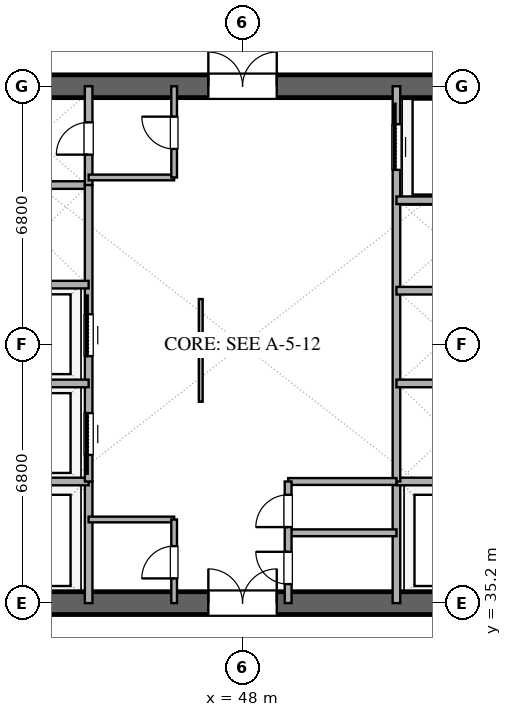
"""IFC4 building model, lengths in metres.
Left out: names, types, materials, properties, quantities, classifications, styles, units other than length and angle.
Written with IfcOpenShell. Run it as: python <this file> out.ifc"""

import sys

from ifc_helpers import new_model, si_unit, direction, frame, frame_2d, origin, place, context, subcontext, project, spatial, rectangle, extrude, element, fill, save


model = new_model("IFC4")
c1 = context("Model", 3, precision=1e-05, world=origin(), true_north=direction((0.0, 1.0)))
c2 = subcontext(c1, "Body", "Model", "MODEL_VIEW")
j1 = project(units=[si_unit("LENGTHUNIT", "METRE"), si_unit("PLANEANGLEUNIT", "RADIAN")], contexts=[c1])
p1 = place(None, origin())
s1 = spatial("IfcSite", under=j1, at=p1, CompositionType="ELEMENT")
p2 = place(p1, origin())
s2 = spatial("IfcBuilding", under=s1, at=p2, CompositionType="ELEMENT")
p3 = place(p2, frame((0.0, 0.0, 60.6)))
s3 = spatial("IfcBuildingStorey", under=s2, at=p3, CompositionType="ELEMENT", Elevation=60.6)
p4 = place(p3, frame((41.0, 35.2, 0.0), z_axis=(0.0, 0.0, 1.0), x_axis=(1.0, 0.0, 0.0)))
e1 = element("IfcWall", 1, at=p4, inside=s3, PredefinedType="SHEAR", context=c2, shape_type="SweptSolid", body=[
    extrude(rectangle(XDim=14.0, YDim=0.6, at=frame_2d((7.0, 0.0))), origin(), (0.0, 0.0, 1.0), 3.38),
])
p5 = place(p4, frame((6.1, 0.0, 0.0)))
e2 = element("IfcOpeningElement", 2, at=p5, cuts=e1, PredefinedType="OPENING", context=c2, shape_type="SweptSolid", body=[
    extrude(rectangle(XDim=1.8, YDim=2.25, at=frame_2d((0.9, 1.125))), frame((0.0, 0.31, 0.0), z_axis=(0.0, -1.0, 0.0), x_axis=(1.0, 0.0, 0.0)), (0.0, 0.0, 1.0), 0.62),
])
p6 = place(p3, frame((41.0, 48.8, 0.0), z_axis=(0.0, 0.0, 1.0), x_axis=(1.0, 0.0, 0.0)))
e3 = element("IfcWall", 3, at=p6, inside=s3, PredefinedType="SHEAR", context=c2, shape_type="SweptSolid", body=[
    extrude(rectangle(XDim=14.0, YDim=0.6, at=frame_2d((7.0, 0.0))), origin(), (0.0, 0.0, 1.0), 3.38),
])
p7 = place(p6, frame((6.1, 0.0, 0.0)))
e4 = element("IfcOpeningElement", 4, at=p7, cuts=e3, PredefinedType="OPENING", context=c2, shape_type="SweptSolid", body=[
    extrude(rectangle(XDim=1.8, YDim=2.25, at=frame_2d((0.9, 1.125))), frame((0.0, 0.31, 0.0), z_axis=(0.0, -1.0, 0.0), x_axis=(1.0, 0.0, 0.0)), (0.0, 0.0, 1.0), 0.62),
])
p8 = place(p3, frame((43.95, 35.2, 0.0), z_axis=(0.0, 0.0, 1.0), x_axis=(0.0, 1.0, 0.0)))
e5 = element("IfcWall", 5, at=p8, inside=s3, PredefinedType="SOLIDWALL", context=c2, shape_type="SweptSolid", body=[
    extrude(rectangle(XDim=3.2, YDim=0.2, at=frame_2d((1.6, 0.0))), origin(), (0.0, 0.0, 1.0), 2.74),
])
p9 = place(p3, frame((41.0, 38.4, 0.0), z_axis=(0.0, 0.0, 1.0), x_axis=(1.0, 0.0, 0.0)))
e6 = element("IfcWall", 6, at=p9, inside=s3, PredefinedType="SOLIDWALL", context=c2, shape_type="SweptSolid", body=[
    extrude(rectangle(XDim=2.95, YDim=0.2, at=frame_2d((1.475, 0.0))), origin(), (0.0, 0.0, 1.0), 2.74),
])
p10 = place(p3, frame((52.05, 35.2, 0.0), z_axis=(0.0, 0.0, 1.0), x_axis=(0.0, 1.0, 0.0)))
e7 = element("IfcWall", 7, at=p10, inside=s3, PredefinedType="SOLIDWALL", context=c2, shape_type="SweptSolid", body=[
    extrude(rectangle(XDim=3.2, YDim=0.2, at=frame_2d((1.6, 0.0))), origin(), (0.0, 0.0, 1.0), 2.74),
])
for number, where, z_axis, x_axis in (
    (8, (52.05, 38.4, 0.0), (0.0, 0.0, 1.0), (1.0, 0.0, 0.0)),
    (9, (41.0, 46.2, 0.0), (0.0, 0.0, 1.0), (1.0, 0.0, 0.0)),
):
    element("IfcWall", number, at=place(p3, frame(where, z_axis=z_axis, x_axis=x_axis)), inside=s3, PredefinedType="SOLIDWALL", context=c2, shape_type="SweptSolid", body=[
        extrude(rectangle(XDim=2.95, YDim=0.2, at=frame_2d((1.475, 0.0))), origin(), (0.0, 0.0, 1.0), 2.74),
    ])
p11 = place(p3, frame((43.95, 46.2, 0.0), z_axis=(0.0, 0.0, 1.0), x_axis=(0.0, 1.0, 0.0)))
e10 = element("IfcWall", 10, at=p11, inside=s3, PredefinedType="SOLIDWALL", context=c2, shape_type="SweptSolid", body=[
    extrude(rectangle(XDim=2.6, YDim=0.2, at=frame_2d((1.3, 0.0))), origin(), (0.0, 0.0, 1.0), 2.74),
])
p12 = place(p11, frame((0.8, 0.0, 0.0)))
e11 = element("IfcOpeningElement", 11, at=p12, cuts=e10, PredefinedType="OPENING", context=c2, shape_type="SweptSolid", body=[
    extrude(rectangle(XDim=0.85, YDim=2.15, at=frame_2d((0.425, 1.075))), frame((0.0, 0.11, 0.0), z_axis=(0.0, -1.0, 0.0), x_axis=(1.0, 0.0, 0.0)), (0.0, 0.0, 1.0), 0.22),
])
p13 = place(p3, frame((43.95, 38.4, 0.0), z_axis=(0.0, 0.0, 1.0), x_axis=(0.0, 1.0, 0.0)))
e12 = element("IfcWall", 12, at=p13, inside=s3, PredefinedType="SOLIDWALL", context=c2, shape_type="SweptSolid", body=[
    extrude(rectangle(XDim=7.8, YDim=0.2, at=frame_2d((3.9, 0.0))), origin(), (0.0, 0.0, 1.0), 2.74),
])
p14 = place(p13, frame((0.7, 0.0, 0.0)))
e13 = element("IfcOpeningElement", 13, at=p14, cuts=e12, PredefinedType="OPENING", context=c2, shape_type="SweptSolid", body=[
    extrude(rectangle(XDim=1.1, YDim=2.2, at=frame_2d((0.55, 1.1))), frame((0.0, 0.11, 0.0), z_axis=(0.0, -1.0, 0.0), x_axis=(1.0, 0.0, 0.0)), (0.0, 0.0, 1.0), 0.22),
])
p15 = place(p13, frame((3.3, 0.0, 0.0)))
e14 = element("IfcOpeningElement", 14, at=p15, cuts=e12, PredefinedType="OPENING", context=c2, shape_type="SweptSolid", body=[
    extrude(rectangle(XDim=1.1, YDim=2.2, at=frame_2d((0.55, 1.1))), frame((0.0, 0.11, 0.0), z_axis=(0.0, -1.0, 0.0), x_axis=(1.0, 0.0, 0.0)), (0.0, 0.0, 1.0), 0.22),
])
for number, where, z_axis, x_axis in (
    (15, (41.0, 40.98, 0.0), (0.0, 0.0, 1.0), (1.0, 0.0, 0.0)),
    (16, (41.0, 43.58, 0.0), (0.0, 0.0, 1.0), (1.0, 0.0, 0.0)),
):
    element("IfcWall", number, at=place(p3, frame(where, z_axis=z_axis, x_axis=x_axis)), inside=s3, PredefinedType="SOLIDWALL", context=c2, shape_type="SweptSolid", body=[
        extrude(rectangle(XDim=2.95, YDim=0.2, at=frame_2d((1.475, 0.0))), origin(), (0.0, 0.0, 1.0), 2.74),
    ])
p16 = place(p3, frame((52.05, 38.4, 0.0), z_axis=(0.0, 0.0, 1.0), x_axis=(0.0, 1.0, 0.0)))
e17 = element("IfcWall", 17, at=p16, inside=s3, PredefinedType="SOLIDWALL", context=c2, shape_type="SweptSolid", body=[
    extrude(rectangle(XDim=10.4, YDim=0.2, at=frame_2d((5.2, 0.0))), origin(), (0.0, 0.0, 1.0), 2.74),
])
p17 = place(p16, frame((8.2, 0.0, 0.0)))
e18 = element("IfcOpeningElement", 18, at=p17, cuts=e17, PredefinedType="OPENING", context=c2, shape_type="SweptSolid", body=[
    extrude(rectangle(XDim=1.2, YDim=2.2, at=frame_2d((0.6, 1.1))), frame((0.0, 0.11, 0.0), z_axis=(0.0, -1.0, 0.0), x_axis=(1.0, 0.0, 0.0)), (0.0, 0.0, 1.0), 0.22),
])
for number, where, z_axis, x_axis in (
    (19, (52.05, 40.98, 0.0), (0.0, 0.0, 1.0), (1.0, 0.0, 0.0)),
    (20, (52.05, 43.42, 0.0), (0.0, 0.0, 1.0), (1.0, 0.0, 0.0)),
    (21, (52.05, 45.8, 0.0), (0.0, 0.0, 1.0), (1.0, 0.0, 0.0)),
):
    element("IfcWall", number, at=place(p3, frame(where, z_axis=z_axis, x_axis=x_axis)), inside=s3, PredefinedType="SOLIDWALL", context=c2, shape_type="SweptSolid", body=[
        extrude(rectangle(XDim=2.95, YDim=0.2, at=frame_2d((1.475, 0.0))), origin(), (0.0, 0.0, 1.0), 2.74),
    ])
p18 = place(p3, frame((43.95, 37.4, 0.0), z_axis=(0.0, 0.0, 1.0), x_axis=(1.0, 0.0, 0.0)))
e22 = element("IfcWall", 22, at=p18, inside=s3, PredefinedType="PARTITIONING", context=c2, shape_type="SweptSolid", body=[
    extrude(rectangle(XDim=2.25, YDim=0.15, at=frame_2d((1.125, 0.0))), origin(), (0.0, 0.0, 1.0), 2.74),
])
p19 = place(p3, frame((46.2, 35.2, 0.0), z_axis=(0.0, 0.0, 1.0), x_axis=(0.0, 1.0, 0.0)))
e23 = element("IfcWall", 23, at=p19, inside=s3, PredefinedType="PARTITIONING", context=c2, shape_type="SweptSolid", body=[
    extrude(rectangle(XDim=2.2, YDim=0.15, at=frame_2d((1.1, 0.0))), origin(), (0.0, 0.0, 1.0), 2.74),
])
p20 = place(p19, frame((0.65, 0.0, 0.0)))
e24 = element("IfcOpeningElement", 24, at=p20, cuts=e23, PredefinedType="OPENING", context=c2, shape_type="SweptSolid", body=[
    extrude(rectangle(XDim=0.85, YDim=2.15, at=frame_2d((0.425, 1.075))), frame((0.0, 0.085, 0.0), z_axis=(0.0, -1.0, 0.0), x_axis=(1.0, 0.0, 0.0)), (0.0, 0.0, 1.0), 0.17),
])
p21 = place(p3, frame((43.95, 46.4, 0.0), z_axis=(0.0, 0.0, 1.0), x_axis=(1.0, 0.0, 0.0)))
e25 = element("IfcWall", 25, at=p21, inside=s3, PredefinedType="PARTITIONING", context=c2, shape_type="SweptSolid", body=[
    extrude(rectangle(XDim=2.25, YDim=0.15, at=frame_2d((1.125, 0.0))), origin(), (0.0, 0.0, 1.0), 2.74),
])
p22 = place(p3, frame((46.2, 46.4, 0.0), z_axis=(0.0, 0.0, 1.0), x_axis=(0.0, 1.0, 0.0)))
e26 = element("IfcWall", 26, at=p22, inside=s3, PredefinedType="PARTITIONING", context=c2, shape_type="SweptSolid", body=[
    extrude(rectangle(XDim=2.4, YDim=0.15, at=frame_2d((1.2, 0.0))), origin(), (0.0, 0.0, 1.0), 2.74),
])
p23 = place(p22, frame((0.75, 0.0, 0.0)))
e27 = element("IfcOpeningElement", 27, at=p23, cuts=e26, PredefinedType="OPENING", context=c2, shape_type="SweptSolid", body=[
    extrude(rectangle(XDim=0.85, YDim=2.15, at=frame_2d((0.425, 1.075))), frame((0.0, 0.085, 0.0), z_axis=(0.0, -1.0, 0.0), x_axis=(1.0, 0.0, 0.0)), (0.0, 0.0, 1.0), 0.17),
])
for number, where, z_axis, x_axis in (
    (28, (49.2, 37.05, 0.0), (0.0, 0.0, 1.0), (1.0, 0.0, 0.0)),
    (29, (49.2, 38.4, 0.0), (0.0, 0.0, 1.0), (1.0, 0.0, 0.0)),
):
    element("IfcWall", number, at=place(p3, frame(where, z_axis=z_axis, x_axis=x_axis)), inside=s3, PredefinedType="PLUMBINGWALL", context=c2, shape_type="SweptSolid", body=[
        extrude(rectangle(XDim=2.85, YDim=0.18, at=frame_2d((1.425, 0.0))), origin(), (0.0, 0.0, 1.0), 2.74),
    ])
p24 = place(p3, frame((49.2, 35.2, 0.0), z_axis=(0.0, 0.0, 1.0), x_axis=(0.0, 1.0, 0.0)))
e30 = element("IfcWall", 30, at=p24, inside=s3, PredefinedType="PLUMBINGWALL", context=c2, shape_type="SweptSolid", body=[
    extrude(rectangle(XDim=3.2, YDim=0.18, at=frame_2d((1.6, 0.0))), origin(), (0.0, 0.0, 1.0), 2.74),
])
p25 = place(p24, frame((0.5, 0.0, 0.0)))
e31 = element("IfcOpeningElement", 31, at=p25, cuts=e30, PredefinedType="OPENING", context=c2, shape_type="SweptSolid", body=[
    extrude(rectangle(XDim=0.85, YDim=2.1, at=frame_2d((0.425, 1.05))), frame((0.0, 0.1, 0.0), z_axis=(0.0, -1.0, 0.0), x_axis=(1.0, 0.0, 0.0)), (0.0, 0.0, 1.0), 0.2),
])
p26 = place(p24, frame((2.0, 0.0, 0.0)))
e32 = element("IfcOpeningElement", 32, at=p26, cuts=e30, PredefinedType="OPENING", context=c2, shape_type="SweptSolid", body=[
    extrude(rectangle(XDim=0.85, YDim=2.15, at=frame_2d((0.425, 1.075))), frame((0.0, 0.1, 0.0), z_axis=(0.0, -1.0, 0.0), x_axis=(1.0, 0.0, 0.0)), (0.0, 0.0, 1.0), 0.2),
])
p27 = place(p3, frame((46.9, 40.5, 0.0), z_axis=(0.0, 0.0, 1.0), x_axis=(0.0, 1.0, 0.0)))
e33 = element("IfcWall", 33, at=p27, inside=s3, PredefinedType="MOVABLE", context=c2, shape_type="SweptSolid", body=[
    extrude(rectangle(XDim=2.7, YDim=0.1, at=frame_2d((1.35, 0.0))), origin(), (0.0, 0.0, 1.0), 2.74),
])
p28 = place(p5, origin())
e34 = element("IfcDoor", 34, at=p28, inside=s3, OperationType="DOUBLE_DOOR_SINGLE_SWING", PredefinedType="DOOR", context=c2, shape_type="SweptSolid", body=[
    extrude(rectangle(XDim=1.8, YDim=2.25, at=frame_2d((0.9, 1.125))), frame((0.0, 0.025, 0.0), z_axis=(0.0, -1.0, 0.0), x_axis=(1.0, 0.0, 0.0)), (0.0, 0.0, 1.0), 0.05),
])
fill(e2, e34)
p29 = place(p7, origin())
e35 = element("IfcDoor", 35, at=p29, inside=s3, OperationType="DOUBLE_DOOR_SINGLE_SWING", PredefinedType="DOOR", context=c2, shape_type="SweptSolid", body=[
    extrude(rectangle(XDim=1.8, YDim=2.25, at=frame_2d((0.9, 1.125))), frame((0.0, 0.025, 0.0), z_axis=(0.0, -1.0, 0.0), x_axis=(1.0, 0.0, 0.0)), (0.0, 0.0, 1.0), 0.05),
])
fill(e4, e35)
p30 = place(p12, origin())
e36 = element("IfcDoor", 36, at=p30, inside=s3, OperationType="SINGLE_SWING_LEFT", PredefinedType="DOOR", context=c2, shape_type="SweptSolid", body=[
    extrude(rectangle(XDim=0.85, YDim=2.15, at=frame_2d((0.425, 1.075))), frame((0.0, 0.025, 0.0), z_axis=(0.0, -1.0, 0.0), x_axis=(1.0, 0.0, 0.0)), (0.0, 0.0, 1.0), 0.05),
])
fill(e11, e36)
p31 = place(p14, origin())
e37 = element("IfcDoor", 37, at=p31, inside=s3, OperationType="SLIDING_TO_LEFT", PredefinedType="DOOR", context=c2, shape_type="SweptSolid", body=[
    extrude(rectangle(XDim=1.1, YDim=2.2, at=frame_2d((0.55, 1.1))), frame((0.0, 0.025, 0.0), z_axis=(0.0, -1.0, 0.0), x_axis=(1.0, 0.0, 0.0)), (0.0, 0.0, 1.0), 0.05),
])
fill(e13, e37)
p32 = place(p15, origin())
e38 = element("IfcDoor", 38, at=p32, inside=s3, OperationType="SLIDING_TO_RIGHT", PredefinedType="DOOR", context=c2, shape_type="SweptSolid", body=[
    extrude(rectangle(XDim=1.1, YDim=2.2, at=frame_2d((0.55, 1.1))), frame((0.0, 0.025, 0.0), z_axis=(0.0, -1.0, 0.0), x_axis=(1.0, 0.0, 0.0)), (0.0, 0.0, 1.0), 0.05),
])
fill(e14, e38)
p33 = place(p17, origin())
e39 = element("IfcDoor", 39, at=p33, inside=s3, OperationType="SLIDING_TO_RIGHT", PredefinedType="DOOR", context=c2, shape_type="SweptSolid", body=[
    extrude(rectangle(XDim=1.2, YDim=2.2, at=frame_2d((0.6, 1.1))), frame((0.0, 0.025, 0.0), z_axis=(0.0, -1.0, 0.0), x_axis=(1.0, 0.0, 0.0)), (0.0, 0.0, 1.0), 0.05),
])
fill(e18, e39)
p34 = place(p20, origin())
e40 = element("IfcDoor", 40, at=p34, inside=s3, OperationType="SINGLE_SWING_LEFT", PredefinedType="DOOR", context=c2, shape_type="SweptSolid", body=[
    extrude(rectangle(XDim=0.85, YDim=2.15, at=frame_2d((0.425, 1.075))), frame((0.0, 0.025, 0.0), z_axis=(0.0, -1.0, 0.0), x_axis=(1.0, 0.0, 0.0)), (0.0, 0.0, 1.0), 0.05),
])
fill(e24, e40)
p35 = place(p23, origin())
e41 = element("IfcDoor", 41, at=p35, inside=s3, OperationType="SINGLE_SWING_RIGHT", PredefinedType="DOOR", context=c2, shape_type="SweptSolid", body=[
    extrude(rectangle(XDim=0.85, YDim=2.15, at=frame_2d((0.425, 1.075))), frame((0.0, 0.025, 0.0), z_axis=(0.0, -1.0, 0.0), x_axis=(1.0, 0.0, 0.0)), (0.0, 0.0, 1.0), 0.05),
])
fill(e27, e41)
p36 = place(p25, origin())
e42 = element("IfcDoor", 42, at=p36, inside=s3, OperationType="SINGLE_SWING_RIGHT", PredefinedType="DOOR", context=c2, shape_type="SweptSolid", body=[
    extrude(rectangle(XDim=0.85, YDim=2.1, at=frame_2d((0.425, 1.05))), frame((0.0, 0.025, 0.0), z_axis=(0.0, -1.0, 0.0), x_axis=(1.0, 0.0, 0.0)), (0.0, 0.0, 1.0), 0.05),
])
fill(e31, e42)
p37 = place(p26, origin())
e43 = element("IfcDoor", 43, at=p37, inside=s3, OperationType="SINGLE_SWING_LEFT", PredefinedType="DOOR", context=c2, shape_type="SweptSolid", body=[
    extrude(rectangle(XDim=0.85, YDim=2.15, at=frame_2d((0.425, 1.075))), frame((0.0, 0.025, 0.0), z_axis=(0.0, -1.0, 0.0), x_axis=(1.0, 0.0, 0.0)), (0.0, 0.0, 1.0), 0.05),
])
fill(e32, e43)
save(model, sys.argv[1])
